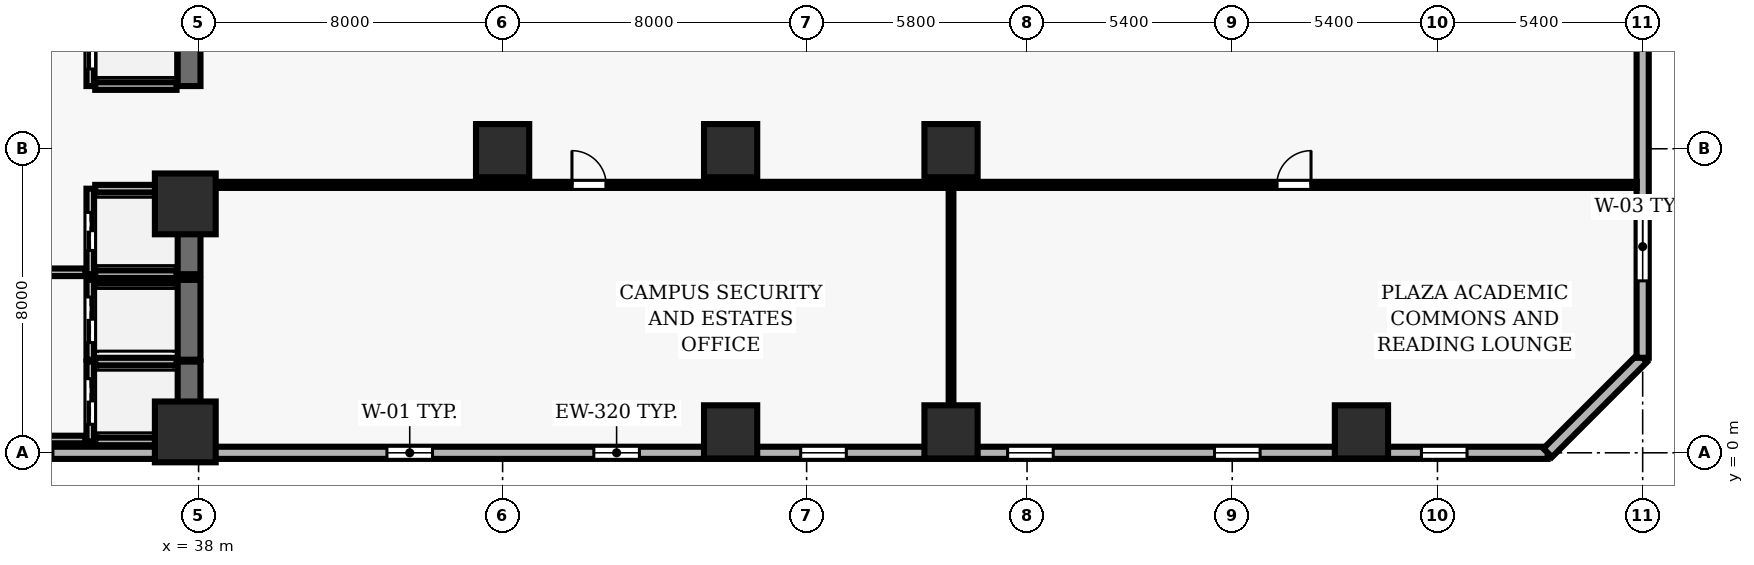
"""IFC4 building model, lengths in metres.
Left out: names, types, materials, properties, quantities, classifications, styles, units other than length and angle.
Written with IfcOpenShell. Run it as: python <this file> out.ifc"""

import sys

from ifc_helpers import new_model, si_unit, direction, frame, frame_2d, origin, origin_2d, place, context, subcontext, project, spatial, rectangle, extrude, element, fill, save


model = new_model("IFC4")
c1 = context("Model", 3, precision=1e-05, world=origin(), true_north=direction((0.0, 1.0)))
c2 = subcontext(c1, "Body", "Model", "MODEL_VIEW")
j1 = project(units=[si_unit("LENGTHUNIT", "METRE"), si_unit("PLANEANGLEUNIT", "RADIAN")], contexts=[c1])
p1 = place(None, origin())
s1 = spatial("IfcSite", under=j1, at=p1, CompositionType="ELEMENT")
p2 = place(p1, origin())
s2 = spatial("IfcBuilding", under=s1, at=p2, CompositionType="ELEMENT")
p3 = place(p2, origin())
s3 = spatial("IfcBuildingStorey", under=s2, at=p3, CompositionType="ELEMENT", Elevation=0.0)
for number, where, z_axis, x_axis in (
    (1, (37.65, 0.55, 0.0), (0.0, 0.0, 1.0), (1.0, 0.0, 0.0)),
    (2, (37.65, 6.55, 0.0), (0.0, 0.0, 1.0), (1.0, 0.0, 0.0)),
):
    element("IfcColumn", number, at=place(p3, frame(where, z_axis=z_axis, x_axis=x_axis)), inside=s3, PredefinedType="COLUMN", context=c2, shape_type="SweptSolid", body=[
        extrude(rectangle(XDim=1.6, YDim=1.6, at=origin_2d()), origin(), (0.0, 0.0, 1.0), 5.2),
    ])
for number, where, z_axis, x_axis in (
    (3, (46.0, 7.95, 0.0), (0.0, 0.0, 1.0), (1.0, 0.0, 0.0)),
    (4, (52.0, 0.55, 0.0), (0.0, 0.0, 1.0), (1.0, 0.0, 0.0)),
    (5, (52.0, 7.95, 0.0), (0.0, 0.0, 1.0), (1.0, 0.0, 0.0)),
    (6, (57.8, 0.55, 0.0), (0.0, 0.0, 1.0), (1.0, 0.0, 0.0)),
    (7, (57.8, 7.95, 0.0), (0.0, 0.0, 1.0), (1.0, 0.0, 0.0)),
    (8, (68.6, 0.55, 0.0), (0.0, 0.0, 1.0), (1.0, 0.0, 0.0)),
):
    element("IfcColumn", number, at=place(p3, frame(where, z_axis=z_axis, x_axis=x_axis)), inside=s3, PredefinedType="COLUMN", context=c2, shape_type="SweptSolid", body=[
        extrude(rectangle(XDim=1.4, YDim=1.4, at=origin_2d()), origin(), (0.0, 0.0, 1.0), 5.2),
    ])
p4 = place(p3, frame((24.5, 0.0, 0.0), z_axis=(0.0, 0.0, 1.0), x_axis=(1.0, 0.0, 0.0)))
e9 = element("IfcWall", 9, at=p4, inside=s3, PredefinedType="SOLIDWALL", context=c2, shape_type="SweptSolid", body=[
    extrude(rectangle(XDim=49.0, YDim=0.32, at=frame_2d((24.5, 0.0))), origin(), (0.0, 0.0, 1.0), 4.92),
])
p5 = place(p4, frame((2.122, 0.0, 0.9)))
e10 = element("IfcOpeningElement", 10, at=p5, cuts=e9, PredefinedType="OPENING", context=c2, shape_type="SweptSolid", body=[
    extrude(rectangle(XDim=1.2, YDim=1.6, at=frame_2d((0.6, 0.8))), frame((0.0, 0.17, 0.0), z_axis=(0.0, -1.0, 0.0), x_axis=(1.0, 0.0, 0.0)), (0.0, 0.0, 1.0), 0.34),
])
p6 = place(p4, frame((8.467, 0.0, 0.9)))
e11 = element("IfcOpeningElement", 11, at=p6, cuts=e9, PredefinedType="OPENING", context=c2, shape_type="SweptSolid", body=[
    extrude(rectangle(XDim=1.2, YDim=1.6, at=frame_2d((0.6, 0.8))), frame((0.0, 0.17, 0.0), z_axis=(0.0, -1.0, 0.0), x_axis=(1.0, 0.0, 0.0)), (0.0, 0.0, 1.0), 0.34),
])
p7 = place(p4, frame((18.456, 0.0, 0.9)))
e12 = element("IfcOpeningElement", 12, at=p7, cuts=e9, PredefinedType="OPENING", context=c2, shape_type="SweptSolid", body=[
    extrude(rectangle(XDim=1.2, YDim=1.6, at=frame_2d((0.6, 0.8))), frame((0.0, 0.17, 0.0), z_axis=(0.0, -1.0, 0.0), x_axis=(1.0, 0.0, 0.0)), (0.0, 0.0, 1.0), 0.34),
])
p8 = place(p4, frame((23.9, 0.0, 0.9)))
e13 = element("IfcOpeningElement", 13, at=p8, cuts=e9, PredefinedType="OPENING", context=c2, shape_type="SweptSolid", body=[
    extrude(rectangle(XDim=1.2, YDim=1.6, at=frame_2d((0.6, 0.8))), frame((0.0, 0.17, 0.0), z_axis=(0.0, -1.0, 0.0), x_axis=(1.0, 0.0, 0.0)), (0.0, 0.0, 1.0), 0.34),
])
p9 = place(p4, frame((29.344, 0.0, 0.9)))
e14 = element("IfcOpeningElement", 14, at=p9, cuts=e9, PredefinedType="OPENING", context=c2, shape_type="SweptSolid", body=[
    extrude(rectangle(XDim=1.2, YDim=1.6, at=frame_2d((0.6, 0.8))), frame((0.0, 0.17, 0.0), z_axis=(0.0, -1.0, 0.0), x_axis=(1.0, 0.0, 0.0)), (0.0, 0.0, 1.0), 0.34),
])
p10 = place(p4, frame((34.789, 0.0, 0.9)))
e15 = element("IfcOpeningElement", 15, at=p10, cuts=e9, PredefinedType="OPENING", context=c2, shape_type="SweptSolid", body=[
    extrude(rectangle(XDim=1.2, YDim=1.6, at=frame_2d((0.6, 0.8))), frame((0.0, 0.17, 0.0), z_axis=(0.0, -1.0, 0.0), x_axis=(1.0, 0.0, 0.0)), (0.0, 0.0, 1.0), 0.34),
])
p11 = place(p4, frame((40.233, 0.0, 0.9)))
e16 = element("IfcOpeningElement", 16, at=p11, cuts=e9, PredefinedType="OPENING", context=c2, shape_type="SweptSolid", body=[
    extrude(rectangle(XDim=1.2, YDim=1.6, at=frame_2d((0.6, 0.8))), frame((0.0, 0.17, 0.0), z_axis=(0.0, -1.0, 0.0), x_axis=(1.0, 0.0, 0.0)), (0.0, 0.0, 1.0), 0.34),
])
p12 = place(p4, frame((45.678, 0.0, 0.9)))
e17 = element("IfcOpeningElement", 17, at=p12, cuts=e9, PredefinedType="OPENING", context=c2, shape_type="SweptSolid", body=[
    extrude(rectangle(XDim=1.2, YDim=1.6, at=frame_2d((0.6, 0.8))), frame((0.0, 0.17, 0.0), z_axis=(0.0, -1.0, 0.0), x_axis=(1.0, 0.0, 0.0)), (0.0, 0.0, 1.0), 0.34),
])
p13 = place(p3, frame((73.5, 0.0, 0.0), z_axis=(0.0, 0.0, 1.0), x_axis=(0.707106781187, 0.707106781187, 0.0)))
e18 = element("IfcWall", 18, at=p13, inside=s3, PredefinedType="SOLIDWALL", context=c2, shape_type="SweptSolid", body=[
    extrude(rectangle(XDim=3.536, YDim=0.32, at=frame_2d((1.768, 0.0))), origin(), (0.0, 0.0, 1.0), 4.92),
])
p14 = place(p3, frame((76.0, 2.5, 0.0), z_axis=(0.0, 0.0, 1.0), x_axis=(0.0, 1.0, 0.0)))
e19 = element("IfcWall", 19, at=p14, inside=s3, PredefinedType="SOLIDWALL", context=c2, shape_type="SweptSolid", body=[
    extrude(rectangle(XDim=27.0, YDim=0.32, at=frame_2d((13.5, 0.0))), origin(), (0.0, 0.0, 1.0), 4.92),
])
p15 = place(p14, frame((14.1, 0.0, 0.0)))
e20 = element("IfcOpeningElement", 20, at=p15, cuts=e19, PredefinedType="OPENING", context=c2, shape_type="SweptSolid", body=[
    extrude(rectangle(XDim=4.0, YDim=2.8, at=frame_2d((2.0, 1.4))), frame((0.0, 0.17, 0.0), z_axis=(0.0, -1.0, 0.0), x_axis=(1.0, 0.0, 0.0)), (0.0, 0.0, 1.0), 0.34),
])
p16 = place(p14, frame((2.025, 0.0, 0.9)))
e21 = element("IfcOpeningElement", 21, at=p16, cuts=e19, PredefinedType="OPENING", context=c2, shape_type="SweptSolid", body=[
    extrude(rectangle(XDim=1.8, YDim=1.6, at=frame_2d((0.9, 0.8))), frame((0.0, 0.17, 0.0), z_axis=(0.0, -1.0, 0.0), x_axis=(1.0, 0.0, 0.0)), (0.0, 0.0, 1.0), 0.34),
])
p17 = place(p14, frame((9.225, 0.0, 0.9)))
e22 = element("IfcOpeningElement", 22, at=p17, cuts=e19, PredefinedType="OPENING", context=c2, shape_type="SweptSolid", body=[
    extrude(rectangle(XDim=1.8, YDim=1.6, at=frame_2d((0.9, 0.8))), frame((0.0, 0.17, 0.0), z_axis=(0.0, -1.0, 0.0), x_axis=(1.0, 0.0, 0.0)), (0.0, 0.0, 1.0), 0.34),
])
p18 = place(p14, frame((22.725, 0.0, 0.9)))
e23 = element("IfcOpeningElement", 23, at=p18, cuts=e19, PredefinedType="OPENING", context=c2, shape_type="SweptSolid", body=[
    extrude(rectangle(XDim=1.8, YDim=1.6, at=frame_2d((0.9, 0.8))), frame((0.0, 0.17, 0.0), z_axis=(0.0, -1.0, 0.0), x_axis=(1.0, 0.0, 0.0)), (0.0, 0.0, 1.0), 0.34),
])
p19 = place(p3, frame((35.15, 2.4, 0.0), z_axis=(0.0, 0.0, 1.0), x_axis=(0.0, -1.0, 0.0)))
e24 = element("IfcWall", 24, at=p19, inside=s3, PredefinedType="SOLIDWALL", context=c2, shape_type="SweptSolid", body=[
    extrude(rectangle(XDim=2.1, YDim=0.2, at=frame_2d((1.05, 0.0))), origin(), (0.0, 0.0, 1.0), 4.92),
])
p20 = place(p19, frame((0.45, 0.0, 0.0)))
e25 = element("IfcOpeningElement", 25, at=p20, cuts=e24, PredefinedType="OPENING", context=c2, shape_type="SweptSolid", body=[
    extrude(rectangle(XDim=1.2, YDim=2.15, at=frame_2d((0.6, 1.075))), frame((0.0, 0.11, 0.0), z_axis=(0.0, -1.0, 0.0), x_axis=(1.0, 0.0, 0.0)), (0.0, 0.0, 1.0), 0.22),
])
p21 = place(p3, frame((37.75, 0.3, 0.0), z_axis=(0.0, 0.0, 1.0), x_axis=(0.0, 1.0, 0.0)))
e26 = element("IfcWall", 26, at=p21, inside=s3, PredefinedType="SHEAR", context=c2, shape_type="SweptSolid", body=[
    extrude(rectangle(XDim=2.1, YDim=0.6, at=frame_2d((1.05, 0.0))), origin(), (0.0, 0.0, 1.0), 4.92),
])
for number, where, z_axis, x_axis in (
    (27, (35.28, 0.3, 0.0), (0.0, 0.0, 1.0), (1.0, 0.0, 0.0)),
    (28, (37.42, 2.4, 0.0), (0.0, 0.0, 1.0), (-1.0, 0.0, 0.0)),
):
    element("IfcWall", number, at=place(p3, frame(where, z_axis=z_axis, x_axis=x_axis)), inside=s3, PredefinedType="SOLIDWALL", context=c2, shape_type="SweptSolid", body=[
        extrude(rectangle(XDim=2.14, YDim=0.2, at=frame_2d((1.07, 0.0))), origin(), (0.0, 0.0, 1.0), 4.92),
    ])
p22 = place(p3, frame((35.15, 4.55, 0.0), z_axis=(0.0, 0.0, 1.0), x_axis=(0.0, -1.0, 0.0)))
e29 = element("IfcWall", 29, at=p22, inside=s3, PredefinedType="SOLIDWALL", context=c2, shape_type="SweptSolid", body=[
    extrude(rectangle(XDim=2.1, YDim=0.2, at=frame_2d((1.05, 0.0))), origin(), (0.0, 0.0, 1.0), 4.92),
])
p23 = place(p22, frame((0.45, 0.0, 0.0)))
e30 = element("IfcOpeningElement", 30, at=p23, cuts=e29, PredefinedType="OPENING", context=c2, shape_type="SweptSolid", body=[
    extrude(rectangle(XDim=1.2, YDim=2.15, at=frame_2d((0.6, 1.075))), frame((0.0, 0.11, 0.0), z_axis=(0.0, -1.0, 0.0), x_axis=(1.0, 0.0, 0.0)), (0.0, 0.0, 1.0), 0.22),
])
p24 = place(p3, frame((37.75, 2.45, 0.0), z_axis=(0.0, 0.0, 1.0), x_axis=(0.0, 1.0, 0.0)))
e31 = element("IfcWall", 31, at=p24, inside=s3, PredefinedType="SHEAR", context=c2, shape_type="SweptSolid", body=[
    extrude(rectangle(XDim=2.1, YDim=0.6, at=frame_2d((1.05, 0.0))), origin(), (0.0, 0.0, 1.0), 4.92),
])
p25 = place(p3, frame((37.42, 4.55, 0.0), z_axis=(0.0, 0.0, 1.0), x_axis=(-1.0, 0.0, 0.0)))
e32 = element("IfcWall", 32, at=p25, inside=s3, PredefinedType="SOLIDWALL", context=c2, shape_type="SweptSolid", body=[
    extrude(rectangle(XDim=2.14, YDim=0.2, at=frame_2d((1.07, 0.0))), origin(), (0.0, 0.0, 1.0), 4.92),
])
p26 = place(p3, frame((35.15, 6.95, 0.0), z_axis=(0.0, 0.0, 1.0), x_axis=(0.0, -1.0, 0.0)))
e33 = element("IfcWall", 33, at=p26, inside=s3, PredefinedType="SOLIDWALL", context=c2, shape_type="SweptSolid", body=[
    extrude(rectangle(XDim=2.25, YDim=0.2, at=frame_2d((1.125, 0.0))), origin(), (0.0, 0.0, 1.0), 4.92),
])
p27 = place(p26, frame((0.625, 0.0, 0.0)))
e34 = element("IfcOpeningElement", 34, at=p27, cuts=e33, PredefinedType="OPENING", context=c2, shape_type="SweptSolid", body=[
    extrude(rectangle(XDim=1.0, YDim=2.1, at=frame_2d((0.5, 1.05))), frame((0.0, 0.11, 0.0), z_axis=(0.0, -1.0, 0.0), x_axis=(1.0, 0.0, 0.0)), (0.0, 0.0, 1.0), 0.22),
])
p28 = place(p3, frame((37.75, 4.7, 0.0), z_axis=(0.0, 0.0, 1.0), x_axis=(0.0, 1.0, 0.0)))
e35 = element("IfcWall", 35, at=p28, inside=s3, PredefinedType="SHEAR", context=c2, shape_type="SweptSolid", body=[
    extrude(rectangle(XDim=2.25, YDim=0.6, at=frame_2d((1.125, 0.0))), origin(), (0.0, 0.0, 1.0), 4.92),
])
for number, where, z_axis, x_axis in (
    (36, (35.28, 4.7, 0.0), (0.0, 0.0, 1.0), (1.0, 0.0, 0.0)),
    (37, (37.42, 6.95, 0.0), (0.0, 0.0, 1.0), (-1.0, 0.0, 0.0)),
):
    element("IfcWall", number, at=place(p3, frame(where, z_axis=z_axis, x_axis=x_axis)), inside=s3, PredefinedType="SOLIDWALL", context=c2, shape_type="SweptSolid", body=[
        extrude(rectangle(XDim=2.14, YDim=0.2, at=frame_2d((1.07, 0.0))), origin(), (0.0, 0.0, 1.0), 4.92),
    ])
p29 = place(p3, frame((35.15, 11.55, 0.0), z_axis=(0.0, 0.0, 1.0), x_axis=(0.0, -1.0, 0.0)))
e38 = element("IfcWall", 38, at=p29, inside=s3, PredefinedType="SOLIDWALL", context=c2, shape_type="SweptSolid", body=[
    extrude(rectangle(XDim=1.9, YDim=0.2, at=frame_2d((0.95, 0.0))), origin(), (0.0, 0.0, 1.0), 4.92),
])
p30 = place(p29, frame((0.45, 0.0, 0.0)))
e39 = element("IfcOpeningElement", 39, at=p30, cuts=e38, PredefinedType="OPENING", context=c2, shape_type="SweptSolid", body=[
    extrude(rectangle(XDim=1.0, YDim=2.1, at=frame_2d((0.5, 1.05))), frame((0.0, 0.11, 0.0), z_axis=(0.0, -1.0, 0.0), x_axis=(1.0, 0.0, 0.0)), (0.0, 0.0, 1.0), 0.22),
])
p31 = place(p3, frame((37.75, 9.65, 0.0), z_axis=(0.0, 0.0, 1.0), x_axis=(0.0, 1.0, 0.0)))
e40 = element("IfcWall", 40, at=p31, inside=s3, PredefinedType="SHEAR", context=c2, shape_type="SweptSolid", body=[
    extrude(rectangle(XDim=1.9, YDim=0.6, at=frame_2d((0.95, 0.0))), origin(), (0.0, 0.0, 1.0), 4.92),
])
p32 = place(p3, frame((35.28, 9.65, 0.0), z_axis=(0.0, 0.0, 1.0), x_axis=(1.0, 0.0, 0.0)))
e41 = element("IfcWall", 41, at=p32, inside=s3, PredefinedType="SOLIDWALL", context=c2, shape_type="SweptSolid", body=[
    extrude(rectangle(XDim=2.14, YDim=0.2, at=frame_2d((1.07, 0.0))), origin(), (0.0, 0.0, 1.0), 4.92),
])
p33 = place(p3, frame((31.65, 0.35, 0.0), z_axis=(0.0, 0.0, 1.0), x_axis=(1.0, 0.0, 0.0)))
e42 = element("IfcWall", 42, at=p33, inside=s3, PredefinedType="SOLIDWALL", context=c2, shape_type="SweptSolid", body=[
    extrude(rectangle(XDim=3.37, YDim=0.2, at=frame_2d((1.685, 0.0))), origin(), (0.0, 0.0, 1.0), 4.92),
])
p34 = place(p3, frame((35.02, 4.75, 0.0), z_axis=(0.0, 0.0, 1.0), x_axis=(-1.0, 0.0, 0.0)))
e43 = element("IfcWall", 43, at=p34, inside=s3, PredefinedType="SOLIDWALL", context=c2, shape_type="SweptSolid", body=[
    extrude(rectangle(XDim=3.11, YDim=0.2, at=frame_2d((1.555, 0.0))), origin(), (0.0, 0.0, 1.0), 4.92),
])
p35 = place(p34, frame((1.03, 0.0, 0.0)))
e44 = element("IfcOpeningElement", 44, at=p35, cuts=e43, PredefinedType="OPENING", context=c2, shape_type="SweptSolid", body=[
    extrude(rectangle(XDim=1.05, YDim=2.15, at=frame_2d((0.525, 1.075))), frame((0.0, 0.11, 0.0), z_axis=(0.0, -1.0, 0.0), x_axis=(1.0, 0.0, 0.0)), (0.0, 0.0, 1.0), 0.22),
])
p36 = place(p3, frame((38.05, 7.05, 0.0), z_axis=(0.0, 0.0, 1.0), x_axis=(1.0, 0.0, 0.0)))
e45 = element("IfcWall", 45, at=p36, inside=s3, PredefinedType="PARTITIONING", context=c2, shape_type="SweptSolid", body=[
    extrude(rectangle(XDim=19.75, YDim=0.16, at=frame_2d((9.875, 0.0))), origin(), (0.0, 0.0, 1.0), 4.92),
])
p37 = place(p36, frame((9.775, 0.0, 0.0)))
e46 = element("IfcOpeningElement", 46, at=p37, cuts=e45, PredefinedType="OPENING", context=c2, shape_type="SweptSolid", body=[
    extrude(rectangle(XDim=0.9, YDim=2.1, at=frame_2d((0.45, 1.05))), frame((0.0, 0.09, 0.0), z_axis=(0.0, -1.0, 0.0), x_axis=(1.0, 0.0, 0.0)), (0.0, 0.0, 1.0), 0.18),
])
p38 = place(p3, frame((57.8, 7.05, 0.0), z_axis=(0.0, 0.0, 1.0), x_axis=(1.0, 0.0, 0.0)))
e47 = element("IfcWall", 47, at=p38, inside=s3, PredefinedType="PARTITIONING", context=c2, shape_type="SweptSolid", body=[
    extrude(rectangle(XDim=18.045, YDim=0.16, at=frame_2d((9.022, 0.0))), origin(), (0.0, 0.0, 1.0), 4.92),
])
p39 = place(p38, frame((8.573, 0.0, 0.0)))
e48 = element("IfcOpeningElement", 48, at=p39, cuts=e47, PredefinedType="OPENING", context=c2, shape_type="SweptSolid", body=[
    extrude(rectangle(XDim=0.9, YDim=2.1, at=frame_2d((0.45, 1.05))), frame((0.0, 0.09, 0.0), z_axis=(0.0, -1.0, 0.0), x_axis=(1.0, 0.0, 0.0)), (0.0, 0.0, 1.0), 0.18),
])
p40 = place(p3, frame((57.8, 0.155, 0.0), z_axis=(0.0, 0.0, 1.0), x_axis=(0.0, 1.0, 0.0)))
e49 = element("IfcWall", 49, at=p40, inside=s3, PredefinedType="PARTITIONING", context=c2, shape_type="SweptSolid", body=[
    extrude(rectangle(XDim=6.82, YDim=0.125, at=frame_2d((3.41, 0.0))), origin(), (0.0, 0.0, 1.0), 4.065),
])
p41 = place(p6, origin())
e50 = element("IfcWindow", 50, at=p41, inside=s3, PartitioningType="SINGLE_PANEL", PredefinedType="WINDOW", context=c2, shape_type="SweptSolid", body=[
    extrude(rectangle(XDim=1.2, YDim=1.6, at=frame_2d((0.6, 0.8))), frame((0.0, 0.03, 0.0), z_axis=(0.0, -1.0, 0.0), x_axis=(1.0, 0.0, 0.0)), (0.0, 0.0, 1.0), 0.06),
])
fill(e11, e50)
p42 = place(p7, origin())
e51 = element("IfcWindow", 51, at=p42, inside=s3, PartitioningType="SINGLE_PANEL", PredefinedType="WINDOW", context=c2, shape_type="SweptSolid", body=[
    extrude(rectangle(XDim=1.2, YDim=1.6, at=frame_2d((0.6, 0.8))), frame((0.0, 0.03, 0.0), z_axis=(0.0, -1.0, 0.0), x_axis=(1.0, 0.0, 0.0)), (0.0, 0.0, 1.0), 0.06),
])
fill(e12, e51)
p43 = place(p8, origin())
e52 = element("IfcWindow", 52, at=p43, inside=s3, PartitioningType="SINGLE_PANEL", PredefinedType="WINDOW", context=c2, shape_type="SweptSolid", body=[
    extrude(rectangle(XDim=1.2, YDim=1.6, at=frame_2d((0.6, 0.8))), frame((0.0, 0.03, 0.0), z_axis=(0.0, -1.0, 0.0), x_axis=(1.0, 0.0, 0.0)), (0.0, 0.0, 1.0), 0.06),
])
fill(e13, e52)
p44 = place(p9, origin())
e53 = element("IfcWindow", 53, at=p44, inside=s3, PartitioningType="SINGLE_PANEL", PredefinedType="WINDOW", context=c2, shape_type="SweptSolid", body=[
    extrude(rectangle(XDim=1.2, YDim=1.6, at=frame_2d((0.6, 0.8))), frame((0.0, 0.03, 0.0), z_axis=(0.0, -1.0, 0.0), x_axis=(1.0, 0.0, 0.0)), (0.0, 0.0, 1.0), 0.06),
])
fill(e14, e53)
p45 = place(p10, origin())
e54 = element("IfcWindow", 54, at=p45, inside=s3, PartitioningType="SINGLE_PANEL", PredefinedType="WINDOW", context=c2, shape_type="SweptSolid", body=[
    extrude(rectangle(XDim=1.2, YDim=1.6, at=frame_2d((0.6, 0.8))), frame((0.0, 0.03, 0.0), z_axis=(0.0, -1.0, 0.0), x_axis=(1.0, 0.0, 0.0)), (0.0, 0.0, 1.0), 0.06),
])
fill(e15, e54)
p46 = place(p11, origin())
e55 = element("IfcWindow", 55, at=p46, inside=s3, PartitioningType="SINGLE_PANEL", PredefinedType="WINDOW", context=c2, shape_type="SweptSolid", body=[
    extrude(rectangle(XDim=1.2, YDim=1.6, at=frame_2d((0.6, 0.8))), frame((0.0, 0.03, 0.0), z_axis=(0.0, -1.0, 0.0), x_axis=(1.0, 0.0, 0.0)), (0.0, 0.0, 1.0), 0.06),
])
fill(e16, e55)
p47 = place(p12, origin())
e56 = element("IfcWindow", 56, at=p47, inside=s3, PartitioningType="SINGLE_PANEL", PredefinedType="WINDOW", context=c2, shape_type="SweptSolid", body=[
    extrude(rectangle(XDim=1.2, YDim=1.6, at=frame_2d((0.6, 0.8))), frame((0.0, 0.03, 0.0), z_axis=(0.0, -1.0, 0.0), x_axis=(1.0, 0.0, 0.0)), (0.0, 0.0, 1.0), 0.06),
])
fill(e17, e56)
p48 = place(p16, origin())
e57 = element("IfcWindow", 57, at=p48, inside=s3, PartitioningType="SINGLE_PANEL", PredefinedType="WINDOW", context=c2, shape_type="SweptSolid", body=[
    extrude(rectangle(XDim=1.8, YDim=1.6, at=frame_2d((0.9, 0.8))), frame((0.0, 0.03, 0.0), z_axis=(0.0, -1.0, 0.0), x_axis=(1.0, 0.0, 0.0)), (0.0, 0.0, 1.0), 0.06),
])
fill(e21, e57)
p49 = place(p20, origin())
e58 = element("IfcDoor", 58, at=p49, inside=s3, OperationType="DOUBLE_DOOR_SLIDING", PredefinedType="DOOR", context=c2, shape_type="SweptSolid", body=[
    extrude(rectangle(XDim=1.2, YDim=2.15, at=frame_2d((0.6, 1.075))), frame((0.0, 0.025, 0.0), z_axis=(0.0, -1.0, 0.0), x_axis=(1.0, 0.0, 0.0)), (0.0, 0.0, 1.0), 0.05),
])
fill(e25, e58)
p50 = place(p23, origin())
e59 = element("IfcDoor", 59, at=p50, inside=s3, OperationType="DOUBLE_DOOR_SLIDING", PredefinedType="DOOR", context=c2, shape_type="SweptSolid", body=[
    extrude(rectangle(XDim=1.2, YDim=2.15, at=frame_2d((0.6, 1.075))), frame((0.0, 0.025, 0.0), z_axis=(0.0, -1.0, 0.0), x_axis=(1.0, 0.0, 0.0)), (0.0, 0.0, 1.0), 0.05),
])
fill(e30, e59)
p51 = place(p27, origin())
e60 = element("IfcDoor", 60, at=p51, inside=s3, OperationType="DOUBLE_DOOR_SLIDING", PredefinedType="DOOR", context=c2, shape_type="SweptSolid", body=[
    extrude(rectangle(XDim=1.0, YDim=2.1, at=frame_2d((0.5, 1.05))), frame((0.0, 0.025, 0.0), z_axis=(0.0, -1.0, 0.0), x_axis=(1.0, 0.0, 0.0)), (0.0, 0.0, 1.0), 0.05),
])
fill(e34, e60)
p52 = place(p30, origin())
e61 = element("IfcDoor", 61, at=p52, inside=s3, OperationType="DOUBLE_DOOR_SLIDING", PredefinedType="DOOR", context=c2, shape_type="SweptSolid", body=[
    extrude(rectangle(XDim=1.0, YDim=2.1, at=frame_2d((0.5, 1.05))), frame((0.0, 0.025, 0.0), z_axis=(0.0, -1.0, 0.0), x_axis=(1.0, 0.0, 0.0)), (0.0, 0.0, 1.0), 0.05),
])
fill(e39, e61)
p53 = place(p37, origin())
e62 = element("IfcDoor", 62, at=p53, inside=s3, OperationType="SINGLE_SWING_LEFT", PredefinedType="DOOR", context=c2, shape_type="SweptSolid", body=[
    extrude(rectangle(XDim=0.9, YDim=2.1, at=frame_2d((0.45, 1.05))), frame((0.0, 0.025, 0.0), z_axis=(0.0, -1.0, 0.0), x_axis=(1.0, 0.0, 0.0)), (0.0, 0.0, 1.0), 0.05),
])
fill(e46, e62)
p54 = place(p39, origin())
e63 = element("IfcDoor", 63, at=p54, inside=s3, OperationType="SINGLE_SWING_RIGHT", PredefinedType="DOOR", context=c2, shape_type="SweptSolid", body=[
    extrude(rectangle(XDim=0.9, YDim=2.1, at=frame_2d((0.45, 1.05))), frame((0.0, 0.025, 0.0), z_axis=(0.0, -1.0, 0.0), x_axis=(1.0, 0.0, 0.0)), (0.0, 0.0, 1.0), 0.05),
])
fill(e48, e63)
save(model, sys.argv[1])
